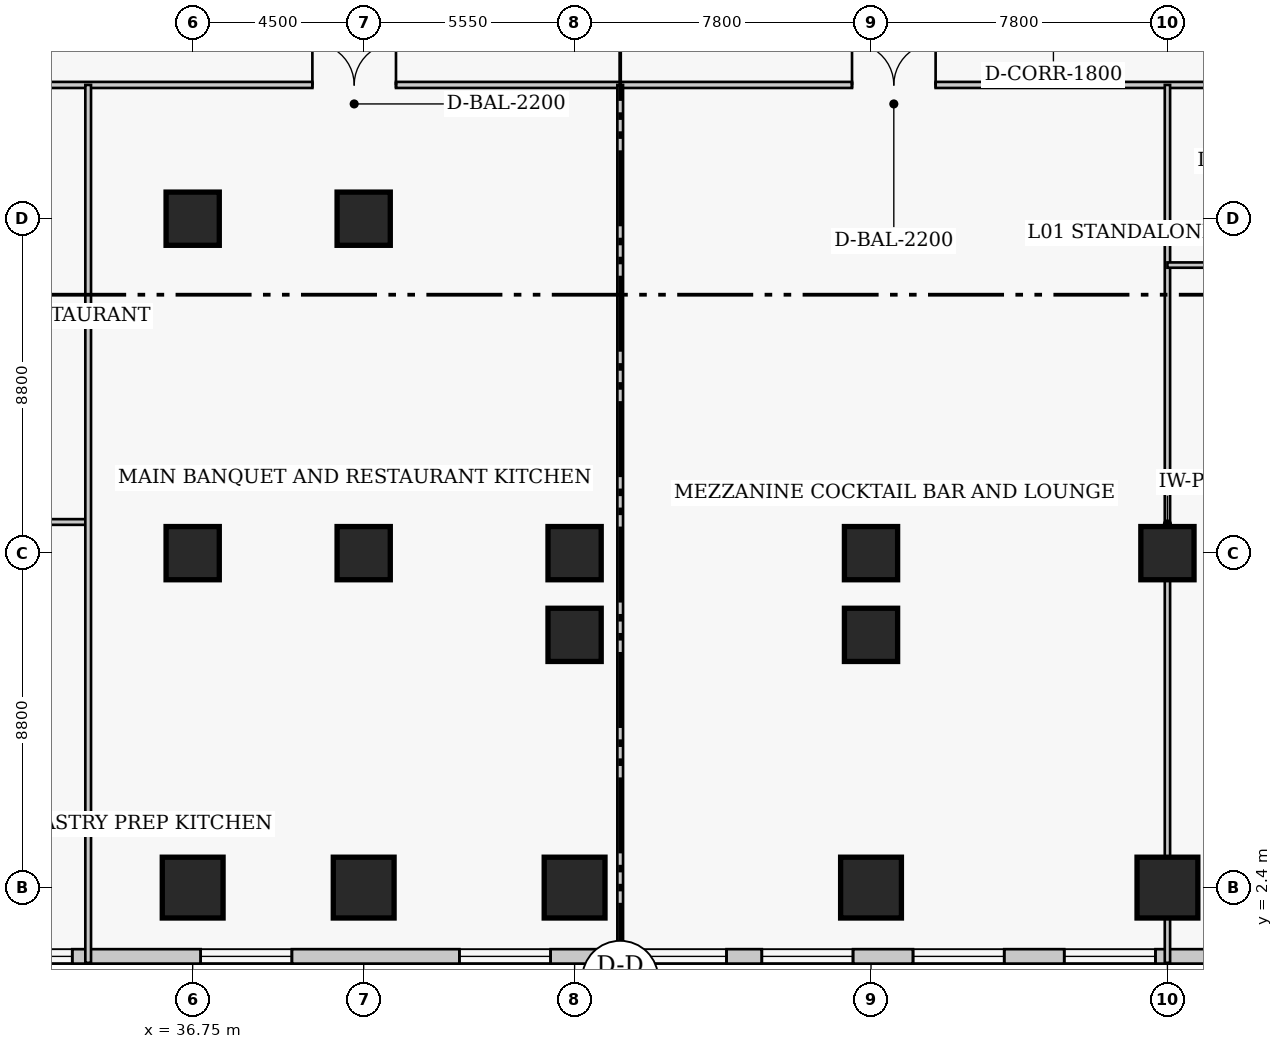
"""IFC4 building model, lengths in metres.
Left out: names, types, materials, properties, quantities, classifications, styles, units other than length and angle.
Written with IfcOpenShell. Run it as: python <this file> out.ifc"""

import sys

from ifc_helpers import new_model, si_unit, direction, frame, frame_2d, origin, origin_2d, place, context, subcontext, project, spatial, rectangle, extrude, element, fill, save


model = new_model("IFC4")
c1 = context("Model", 3, precision=1e-05, world=origin(), true_north=direction((0.0, 1.0)))
c2 = subcontext(c1, "Body", "Model", "MODEL_VIEW")
j1 = project(units=[si_unit("LENGTHUNIT", "METRE"), si_unit("PLANEANGLEUNIT", "RADIAN")], contexts=[c1])
p1 = place(None, origin())
s1 = spatial("IfcSite", under=j1, at=p1, CompositionType="ELEMENT")
p2 = place(p1, origin())
s2 = spatial("IfcBuilding", under=s1, at=p2, CompositionType="ELEMENT")
p3 = place(p2, frame((0.0, 0.0, 5.4)))
s3 = spatial("IfcBuildingStorey", under=s2, at=p3, CompositionType="ELEMENT", Elevation=5.4)
p4 = place(p3, frame((36.75, 2.4, 0.0), z_axis=(0.0, 0.0, 1.0), x_axis=(1.0, 0.0, 0.0)))
e1 = element("IfcColumn", 1, at=p4, inside=s3, PredefinedType="COLUMN", context=c2, shape_type="SweptSolid", body=[
    extrude(rectangle(XDim=1.6, YDim=1.6, at=origin_2d()), origin(), (0.0, 0.0, 1.0), 5.0),
])
for number, where, z_axis, x_axis in (
    (2, (36.75, 11.2, 0.0), (0.0, 0.0, 1.0), (1.0, 0.0, 0.0)),
    (3, (36.75, 20.0, 0.0), (0.0, 0.0, 1.0), (1.0, 0.0, 0.0)),
):
    element("IfcColumn", number, at=place(p3, frame(where, z_axis=z_axis, x_axis=x_axis)), inside=s3, PredefinedType="COLUMN", context=c2, shape_type="SweptSolid", body=[
        extrude(rectangle(XDim=1.4, YDim=1.4, at=origin_2d()), origin(), (0.0, 0.0, 1.0), 5.0),
    ])
p5 = place(p3, frame((41.25, 2.4, 0.0), z_axis=(0.0, 0.0, 1.0), x_axis=(1.0, 0.0, 0.0)))
e4 = element("IfcColumn", 4, at=p5, inside=s3, PredefinedType="COLUMN", context=c2, shape_type="SweptSolid", body=[
    extrude(rectangle(XDim=1.6, YDim=1.6, at=origin_2d()), origin(), (0.0, 0.0, 1.0), 5.0),
])
for number, where, z_axis, x_axis in (
    (5, (41.25, 11.2, 0.0), (0.0, 0.0, 1.0), (1.0, 0.0, 0.0)),
    (6, (41.25, 20.0, 0.0), (0.0, 0.0, 1.0), (1.0, 0.0, 0.0)),
):
    element("IfcColumn", number, at=place(p3, frame(where, z_axis=z_axis, x_axis=x_axis)), inside=s3, PredefinedType="COLUMN", context=c2, shape_type="SweptSolid", body=[
        extrude(rectangle(XDim=1.4, YDim=1.4, at=origin_2d()), origin(), (0.0, 0.0, 1.0), 5.0),
    ])
p6 = place(p3, frame((46.8, 2.4, 0.0), z_axis=(0.0, 0.0, 1.0), x_axis=(1.0, 0.0, 0.0)))
e7 = element("IfcColumn", 7, at=p6, inside=s3, PredefinedType="COLUMN", context=c2, shape_type="SweptSolid", body=[
    extrude(rectangle(XDim=1.6, YDim=1.6, at=origin_2d()), origin(), (0.0, 0.0, 1.0), 5.0),
])
p7 = place(p3, frame((46.8, 11.2, 0.0), z_axis=(0.0, 0.0, 1.0), x_axis=(1.0, 0.0, 0.0)))
e8 = element("IfcColumn", 8, at=p7, inside=s3, PredefinedType="COLUMN", context=c2, shape_type="SweptSolid", body=[
    extrude(rectangle(XDim=1.4, YDim=1.4, at=origin_2d()), origin(), (0.0, 0.0, 1.0), 5.0),
])
p8 = place(p3, frame((54.6, 2.4, 0.0), z_axis=(0.0, 0.0, 1.0), x_axis=(1.0, 0.0, 0.0)))
e9 = element("IfcColumn", 9, at=p8, inside=s3, PredefinedType="COLUMN", context=c2, shape_type="SweptSolid", body=[
    extrude(rectangle(XDim=1.6, YDim=1.6, at=origin_2d()), origin(), (0.0, 0.0, 1.0), 5.0),
])
p9 = place(p3, frame((54.6, 11.2, 0.0), z_axis=(0.0, 0.0, 1.0), x_axis=(1.0, 0.0, 0.0)))
e10 = element("IfcColumn", 10, at=p9, inside=s3, PredefinedType="COLUMN", context=c2, shape_type="SweptSolid", body=[
    extrude(rectangle(XDim=1.4, YDim=1.4, at=origin_2d()), origin(), (0.0, 0.0, 1.0), 5.0),
])
p10 = place(p3, frame((62.4, 2.4, 0.0), z_axis=(0.0, 0.0, 1.0), x_axis=(1.0, 0.0, 0.0)))
e11 = element("IfcColumn", 11, at=p10, inside=s3, PredefinedType="COLUMN", context=c2, shape_type="SweptSolid", body=[
    extrude(rectangle(XDim=1.6, YDim=1.6, at=origin_2d()), origin(), (0.0, 0.0, 1.0), 5.0),
])
for number, where, z_axis, x_axis in (
    (12, (62.4, 11.2, 0.0), (0.0, 0.0, 1.0), (1.0, 0.0, 0.0)),
    (13, (46.8, 9.05, 0.0), (0.0, 0.0, 1.0), (1.0, 0.0, 0.0)),
    (14, (54.6, 9.05, 0.0), (0.0, 0.0, 1.0), (1.0, 0.0, 0.0)),
):
    element("IfcColumn", number, at=place(p3, frame(where, z_axis=z_axis, x_axis=x_axis)), inside=s3, PredefinedType="COLUMN", context=c2, shape_type="SweptSolid", body=[
        extrude(rectangle(XDim=1.4, YDim=1.4, at=origin_2d()), origin(), (0.0, 0.0, 1.0), 5.0),
    ])
p11 = place(p3, frame((-0.79, 0.59, 0.0), z_axis=(0.0, 0.0, 1.0), x_axis=(1.0, 0.0, 0.0)))
e15 = element("IfcWall", 15, at=p11, inside=s3, PredefinedType="SOLIDWALL", context=c2, shape_type="SweptSolid", body=[
    extrude(rectangle(XDim=79.58, YDim=0.38, at=frame_2d((39.79, 0.0))), origin(), (0.0, 0.0, 1.0), 4.65),
])
p12 = place(p11, frame((1.439, 0.0, 0.75)))
e16 = element("IfcOpeningElement", 16, at=p12, cuts=e15, PredefinedType="OPENING", context=c2, shape_type="SweptSolid", body=[
    extrude(rectangle(XDim=2.4, YDim=2.2, at=frame_2d((1.2, 1.1))), frame((0.0, 0.2, 0.0), z_axis=(0.0, -1.0, 0.0), x_axis=(1.0, 0.0, 0.0)), (0.0, 0.0, 1.0), 0.4),
])
p13 = place(p11, frame((4.769, 0.0, 0.75)))
e17 = element("IfcOpeningElement", 17, at=p13, cuts=e15, PredefinedType="OPENING", context=c2, shape_type="SweptSolid", body=[
    extrude(rectangle(XDim=2.4, YDim=2.2, at=frame_2d((1.2, 1.1))), frame((0.0, 0.2, 0.0), z_axis=(0.0, -1.0, 0.0), x_axis=(1.0, 0.0, 0.0)), (0.0, 0.0, 1.0), 0.4),
])
p14 = place(p11, frame((16.706, 0.0, 0.75)))
e18 = element("IfcOpeningElement", 18, at=p14, cuts=e15, PredefinedType="OPENING", context=c2, shape_type="SweptSolid", body=[
    extrude(rectangle(XDim=2.4, YDim=2.2, at=frame_2d((1.2, 1.1))), frame((0.0, 0.2, 0.0), z_axis=(0.0, -1.0, 0.0), x_axis=(1.0, 0.0, 0.0)), (0.0, 0.0, 1.0), 0.4),
])
p15 = place(p11, frame((20.685, 0.0, 0.75)))
e19 = element("IfcOpeningElement", 19, at=p15, cuts=e15, PredefinedType="OPENING", context=c2, shape_type="SweptSolid", body=[
    extrude(rectangle(XDim=2.4, YDim=2.2, at=frame_2d((1.2, 1.1))), frame((0.0, 0.2, 0.0), z_axis=(0.0, -1.0, 0.0), x_axis=(1.0, 0.0, 0.0)), (0.0, 0.0, 1.0), 0.4),
])
p16 = place(p11, frame((24.664, 0.0, 0.75)))
e20 = element("IfcOpeningElement", 20, at=p16, cuts=e15, PredefinedType="OPENING", context=c2, shape_type="SweptSolid", body=[
    extrude(rectangle(XDim=2.4, YDim=2.2, at=frame_2d((1.2, 1.1))), frame((0.0, 0.2, 0.0), z_axis=(0.0, -1.0, 0.0), x_axis=(1.0, 0.0, 0.0)), (0.0, 0.0, 1.0), 0.4),
])
p17 = place(p11, frame((28.643, 0.0, 0.75)))
e21 = element("IfcOpeningElement", 21, at=p17, cuts=e15, PredefinedType="OPENING", context=c2, shape_type="SweptSolid", body=[
    extrude(rectangle(XDim=2.4, YDim=2.2, at=frame_2d((1.2, 1.1))), frame((0.0, 0.2, 0.0), z_axis=(0.0, -1.0, 0.0), x_axis=(1.0, 0.0, 0.0)), (0.0, 0.0, 1.0), 0.4),
])
p18 = place(p11, frame((31.971, 0.0, 0.75)))
e22 = element("IfcOpeningElement", 22, at=p18, cuts=e15, PredefinedType="OPENING", context=c2, shape_type="SweptSolid", body=[
    extrude(rectangle(XDim=2.4, YDim=2.2, at=frame_2d((1.2, 1.1))), frame((0.0, 0.2, 0.0), z_axis=(0.0, -1.0, 0.0), x_axis=(1.0, 0.0, 0.0)), (0.0, 0.0, 1.0), 0.4),
])
p19 = place(p11, frame((37.75, 0.0, 0.75)))
e23 = element("IfcOpeningElement", 23, at=p19, cuts=e15, PredefinedType="OPENING", context=c2, shape_type="SweptSolid", body=[
    extrude(rectangle(XDim=2.4, YDim=2.2, at=frame_2d((1.2, 1.1))), frame((0.0, 0.2, 0.0), z_axis=(0.0, -1.0, 0.0), x_axis=(1.0, 0.0, 0.0)), (0.0, 0.0, 1.0), 0.4),
])
p20 = place(p11, frame((44.559, 0.0, 0.75)))
e24 = element("IfcOpeningElement", 24, at=p20, cuts=e15, PredefinedType="OPENING", context=c2, shape_type="SweptSolid", body=[
    extrude(rectangle(XDim=2.4, YDim=2.2, at=frame_2d((1.2, 1.1))), frame((0.0, 0.2, 0.0), z_axis=(0.0, -1.0, 0.0), x_axis=(1.0, 0.0, 0.0)), (0.0, 0.0, 1.0), 0.4),
])
p21 = place(p11, frame((49.188, 0.0, 0.75)))
e25 = element("IfcOpeningElement", 25, at=p21, cuts=e15, PredefinedType="OPENING", context=c2, shape_type="SweptSolid", body=[
    extrude(rectangle(XDim=2.4, YDim=2.2, at=frame_2d((1.2, 1.1))), frame((0.0, 0.2, 0.0), z_axis=(0.0, -1.0, 0.0), x_axis=(1.0, 0.0, 0.0)), (0.0, 0.0, 1.0), 0.4),
])
p22 = place(p11, frame((52.517, 0.0, 0.75)))
e26 = element("IfcOpeningElement", 26, at=p22, cuts=e15, PredefinedType="OPENING", context=c2, shape_type="SweptSolid", body=[
    extrude(rectangle(XDim=2.4, YDim=2.2, at=frame_2d((1.2, 1.1))), frame((0.0, 0.2, 0.0), z_axis=(0.0, -1.0, 0.0), x_axis=(1.0, 0.0, 0.0)), (0.0, 0.0, 1.0), 0.4),
])
p23 = place(p11, frame((56.496, 0.0, 0.75)))
e27 = element("IfcOpeningElement", 27, at=p23, cuts=e15, PredefinedType="OPENING", context=c2, shape_type="SweptSolid", body=[
    extrude(rectangle(XDim=2.4, YDim=2.2, at=frame_2d((1.2, 1.1))), frame((0.0, 0.2, 0.0), z_axis=(0.0, -1.0, 0.0), x_axis=(1.0, 0.0, 0.0)), (0.0, 0.0, 1.0), 0.4),
])
p24 = place(p11, frame((60.475, 0.0, 0.75)))
e28 = element("IfcOpeningElement", 28, at=p24, cuts=e15, PredefinedType="OPENING", context=c2, shape_type="SweptSolid", body=[
    extrude(rectangle(XDim=2.4, YDim=2.2, at=frame_2d((1.2, 1.1))), frame((0.0, 0.2, 0.0), z_axis=(0.0, -1.0, 0.0), x_axis=(1.0, 0.0, 0.0)), (0.0, 0.0, 1.0), 0.4),
])
p25 = place(p11, frame((64.454, 0.0, 0.75)))
e29 = element("IfcOpeningElement", 29, at=p25, cuts=e15, PredefinedType="OPENING", context=c2, shape_type="SweptSolid", body=[
    extrude(rectangle(XDim=2.4, YDim=2.2, at=frame_2d((1.2, 1.1))), frame((0.0, 0.2, 0.0), z_axis=(0.0, -1.0, 0.0), x_axis=(1.0, 0.0, 0.0)), (0.0, 0.0, 1.0), 0.4),
])
p26 = place(p11, frame((68.433, 0.0, 0.75)))
e30 = element("IfcOpeningElement", 30, at=p26, cuts=e15, PredefinedType="OPENING", context=c2, shape_type="SweptSolid", body=[
    extrude(rectangle(XDim=2.4, YDim=2.2, at=frame_2d((1.2, 1.1))), frame((0.0, 0.2, 0.0), z_axis=(0.0, -1.0, 0.0), x_axis=(1.0, 0.0, 0.0)), (0.0, 0.0, 1.0), 0.4),
])
p27 = place(p11, frame((72.412, 0.0, 0.75)))
e31 = element("IfcOpeningElement", 31, at=p27, cuts=e15, PredefinedType="OPENING", context=c2, shape_type="SweptSolid", body=[
    extrude(rectangle(XDim=2.4, YDim=2.2, at=frame_2d((1.2, 1.1))), frame((0.0, 0.2, 0.0), z_axis=(0.0, -1.0, 0.0), x_axis=(1.0, 0.0, 0.0)), (0.0, 0.0, 1.0), 0.4),
])
p28 = place(p11, frame((75.74, 0.0, 0.75)))
e32 = element("IfcOpeningElement", 32, at=p28, cuts=e15, PredefinedType="OPENING", context=c2, shape_type="SweptSolid", body=[
    extrude(rectangle(XDim=2.4, YDim=2.2, at=frame_2d((1.2, 1.1))), frame((0.0, 0.2, 0.0), z_axis=(0.0, -1.0, 0.0), x_axis=(1.0, 0.0, 0.0)), (0.0, 0.0, 1.0), 0.4),
])
p29 = place(p3, frame((-2.98, 23.52, 0.0), z_axis=(0.0, 0.0, 1.0), x_axis=(1.0, 0.0, 0.0)))
e33 = element("IfcWall", 33, at=p29, inside=s3, PredefinedType="PARTITIONING", context=c2, shape_type="SweptSolid", body=[
    extrude(rectangle(XDim=83.96, YDim=0.16, at=frame_2d((41.98, 0.0))), origin(), (0.0, 0.0, 1.0), 4.65),
])
p30 = place(p29, frame((7.13, 0.0, 0.0)))
e34 = element("IfcOpeningElement", 34, at=p30, cuts=e33, PredefinedType="OPENING", context=c2, shape_type="SweptSolid", body=[
    extrude(rectangle(XDim=1.0, YDim=2.15, at=frame_2d((0.5, 1.075))), frame((0.0, 0.09, 0.0), z_axis=(0.0, -1.0, 0.0), x_axis=(1.0, 0.0, 0.0)), (0.0, 0.0, 1.0), 0.18),
])
p31 = place(p29, frame((11.96, 0.0, 0.0)))
e35 = element("IfcOpeningElement", 35, at=p31, cuts=e33, PredefinedType="OPENING", context=c2, shape_type="SweptSolid", body=[
    extrude(rectangle(XDim=1.1, YDim=2.15, at=frame_2d((0.55, 1.075))), frame((0.0, 0.09, 0.0), z_axis=(0.0, -1.0, 0.0), x_axis=(1.0, 0.0, 0.0)), (0.0, 0.0, 1.0), 0.18),
])
p32 = place(p29, frame((15.205, 0.0, 0.0)))
e36 = element("IfcOpeningElement", 36, at=p32, cuts=e33, PredefinedType="OPENING", context=c2, shape_type="SweptSolid", body=[
    extrude(rectangle(XDim=0.95, YDim=2.1, at=frame_2d((0.475, 1.05))), frame((0.0, 0.09, 0.0), z_axis=(0.0, -1.0, 0.0), x_axis=(1.0, 0.0, 0.0)), (0.0, 0.0, 1.0), 0.18),
])
p33 = place(p29, frame((28.63, 0.0, 0.0)))
e37 = element("IfcOpeningElement", 37, at=p33, cuts=e33, PredefinedType="OPENING", context=c2, shape_type="SweptSolid", body=[
    extrude(rectangle(XDim=2.2, YDim=2.4, at=frame_2d((1.1, 1.2))), frame((0.0, 0.09, 0.0), z_axis=(0.0, -1.0, 0.0), x_axis=(1.0, 0.0, 0.0)), (0.0, 0.0, 1.0), 0.18),
])
p34 = place(p29, frame((42.88, 0.0, 0.0)))
e38 = element("IfcOpeningElement", 38, at=p34, cuts=e33, PredefinedType="OPENING", context=c2, shape_type="SweptSolid", body=[
    extrude(rectangle(XDim=2.2, YDim=2.4, at=frame_2d((1.1, 1.2))), frame((0.0, 0.09, 0.0), z_axis=(0.0, -1.0, 0.0), x_axis=(1.0, 0.0, 0.0)), (0.0, 0.0, 1.0), 0.18),
])
p35 = place(p29, frame((57.08, 0.0, 0.0)))
e39 = element("IfcOpeningElement", 39, at=p35, cuts=e33, PredefinedType="OPENING", context=c2, shape_type="SweptSolid", body=[
    extrude(rectangle(XDim=2.2, YDim=2.4, at=frame_2d((1.1, 1.2))), frame((0.0, 0.09, 0.0), z_axis=(0.0, -1.0, 0.0), x_axis=(1.0, 0.0, 0.0)), (0.0, 0.0, 1.0), 0.18),
])
p36 = place(p29, frame((67.34, 0.0, 0.0)))
e40 = element("IfcOpeningElement", 40, at=p36, cuts=e33, PredefinedType="OPENING", context=c2, shape_type="SweptSolid", body=[
    extrude(rectangle(XDim=0.88, YDim=2.05, at=frame_2d((0.44, 1.025))), frame((0.0, 0.09, 0.0), z_axis=(0.0, -1.0, 0.0), x_axis=(1.0, 0.0, 0.0)), (0.0, 0.0, 1.0), 0.18),
])
p37 = place(p29, frame((76.29, 0.0, 0.0)))
e41 = element("IfcOpeningElement", 41, at=p37, cuts=e33, PredefinedType="OPENING", context=c2, shape_type="SweptSolid", body=[
    extrude(rectangle(XDim=0.88, YDim=2.05, at=frame_2d((0.44, 1.025))), frame((0.0, 0.09, 0.0), z_axis=(0.0, -1.0, 0.0), x_axis=(1.0, 0.0, 0.0)), (0.0, 0.0, 1.0), 0.18),
])
p38 = place(p3, frame((19.5, 12.02, 0.0), z_axis=(0.0, 0.0, 1.0), x_axis=(1.0, 0.0, 0.0)))
e42 = element("IfcWall", 42, at=p38, inside=s3, PredefinedType="PARTITIONING", context=c2, shape_type="SweptSolid", body=[
    extrude(rectangle(XDim=14.5, YDim=0.15, at=frame_2d((7.25, 0.0))), origin(), (0.0, 0.0, 1.0), 4.65),
])
p39 = place(p38, frame((6.1, 0.0, 0.0)))
e43 = element("IfcOpeningElement", 43, at=p39, cuts=e42, PredefinedType="OPENING", context=c2, shape_type="SweptSolid", body=[
    extrude(rectangle(XDim=1.8, YDim=2.2, at=frame_2d((0.9, 1.1))), frame((0.0, 0.085, 0.0), z_axis=(0.0, -1.0, 0.0), x_axis=(1.0, 0.0, 0.0)), (0.0, 0.0, 1.0), 0.17),
])
for number, where, z_axis, x_axis in (
    (44, (34.0, 0.42, 0.0), (0.0, 0.0, 1.0), (0.0, 1.0, 0.0)),
    (45, (48.0, 0.42, 0.0), (0.0, 0.0, 1.0), (0.0, 1.0, 0.0)),
):
    element("IfcWall", number, at=place(p3, frame(where, z_axis=z_axis, x_axis=x_axis)), inside=s3, PredefinedType="PARTITIONING", context=c2, shape_type="SweptSolid", body=[
        extrude(rectangle(XDim=23.1, YDim=0.15, at=frame_2d((11.55, 0.0))), origin(), (0.0, 0.0, 1.0), 4.65),
    ])
p40 = place(p3, frame((62.4, 0.42, 0.0), z_axis=(0.0, 0.0, 1.0), x_axis=(0.0, 1.0, 0.0)))
e46 = element("IfcWall", 46, at=p40, inside=s3, PredefinedType="PLUMBINGWALL", context=c2, shape_type="SweptSolid", body=[
    extrude(rectangle(XDim=23.1, YDim=0.14, at=frame_2d((11.55, 0.0))), origin(), (0.0, 0.0, 1.0), 3.9),
])
p41 = place(p3, frame((62.4, 18.78, 0.0), z_axis=(0.0, 0.0, 1.0), x_axis=(1.0, 0.0, 0.0)))
e47 = element("IfcWall", 47, at=p41, inside=s3, PredefinedType="PLUMBINGWALL", context=c2, shape_type="SweptSolid", body=[
    extrude(rectangle(XDim=18.58, YDim=0.14, at=frame_2d((9.29, 0.0))), origin(), (0.0, 0.0, 1.0), 4.65),
])
p42 = place(p41, frame((9.489, 0.0, 0.0)))
e48 = element("IfcOpeningElement", 48, at=p42, cuts=e47, PredefinedType="OPENING", context=c2, shape_type="SweptSolid", body=[
    extrude(rectangle(XDim=0.88, YDim=2.05, at=frame_2d((0.44, 1.025))), frame((0.0, 0.08, 0.0), z_axis=(0.0, -1.0, 0.0), x_axis=(1.0, 0.0, 0.0)), (0.0, 0.0, 1.0), 0.16),
])
p43 = place(p18, origin())
e49 = element("IfcWindow", 49, at=p43, inside=s3, PartitioningType="SINGLE_PANEL", PredefinedType="WINDOW", context=c2, shape_type="SweptSolid", body=[
    extrude(rectangle(XDim=2.4, YDim=2.2, at=frame_2d((1.2, 1.1))), frame((0.0, 0.03, 0.0), z_axis=(0.0, -1.0, 0.0), x_axis=(1.0, 0.0, 0.0)), (0.0, 0.0, 1.0), 0.06),
])
fill(e22, e49)
p44 = place(p19, origin())
e50 = element("IfcWindow", 50, at=p44, inside=s3, PartitioningType="SINGLE_PANEL", PredefinedType="WINDOW", context=c2, shape_type="SweptSolid", body=[
    extrude(rectangle(XDim=2.4, YDim=2.2, at=frame_2d((1.2, 1.1))), frame((0.0, 0.03, 0.0), z_axis=(0.0, -1.0, 0.0), x_axis=(1.0, 0.0, 0.0)), (0.0, 0.0, 1.0), 0.06),
])
fill(e23, e50)
p45 = place(p20, origin())
e51 = element("IfcWindow", 51, at=p45, inside=s3, PartitioningType="SINGLE_PANEL", PredefinedType="WINDOW", context=c2, shape_type="SweptSolid", body=[
    extrude(rectangle(XDim=2.4, YDim=2.2, at=frame_2d((1.2, 1.1))), frame((0.0, 0.03, 0.0), z_axis=(0.0, -1.0, 0.0), x_axis=(1.0, 0.0, 0.0)), (0.0, 0.0, 1.0), 0.06),
])
fill(e24, e51)
p46 = place(p21, origin())
e52 = element("IfcWindow", 52, at=p46, inside=s3, PartitioningType="SINGLE_PANEL", PredefinedType="WINDOW", context=c2, shape_type="SweptSolid", body=[
    extrude(rectangle(XDim=2.4, YDim=2.2, at=frame_2d((1.2, 1.1))), frame((0.0, 0.03, 0.0), z_axis=(0.0, -1.0, 0.0), x_axis=(1.0, 0.0, 0.0)), (0.0, 0.0, 1.0), 0.06),
])
fill(e25, e52)
p47 = place(p22, origin())
e53 = element("IfcWindow", 53, at=p47, inside=s3, PartitioningType="SINGLE_PANEL", PredefinedType="WINDOW", context=c2, shape_type="SweptSolid", body=[
    extrude(rectangle(XDim=2.4, YDim=2.2, at=frame_2d((1.2, 1.1))), frame((0.0, 0.03, 0.0), z_axis=(0.0, -1.0, 0.0), x_axis=(1.0, 0.0, 0.0)), (0.0, 0.0, 1.0), 0.06),
])
fill(e26, e53)
p48 = place(p23, origin())
e54 = element("IfcWindow", 54, at=p48, inside=s3, PartitioningType="SINGLE_PANEL", PredefinedType="WINDOW", context=c2, shape_type="SweptSolid", body=[
    extrude(rectangle(XDim=2.4, YDim=2.2, at=frame_2d((1.2, 1.1))), frame((0.0, 0.03, 0.0), z_axis=(0.0, -1.0, 0.0), x_axis=(1.0, 0.0, 0.0)), (0.0, 0.0, 1.0), 0.06),
])
fill(e27, e54)
p49 = place(p24, origin())
e55 = element("IfcWindow", 55, at=p49, inside=s3, PartitioningType="SINGLE_PANEL", PredefinedType="WINDOW", context=c2, shape_type="SweptSolid", body=[
    extrude(rectangle(XDim=2.4, YDim=2.2, at=frame_2d((1.2, 1.1))), frame((0.0, 0.03, 0.0), z_axis=(0.0, -1.0, 0.0), x_axis=(1.0, 0.0, 0.0)), (0.0, 0.0, 1.0), 0.06),
])
fill(e28, e55)
p50 = place(p34, origin())
e56 = element("IfcDoor", 56, at=p50, inside=s3, OperationType="DOUBLE_DOOR_SINGLE_SWING", PredefinedType="DOOR", context=c2, shape_type="SweptSolid", body=[
    extrude(rectangle(XDim=2.2, YDim=2.4, at=frame_2d((1.1, 1.2))), frame((0.0, 0.025, 0.0), z_axis=(0.0, -1.0, 0.0), x_axis=(1.0, 0.0, 0.0)), (0.0, 0.0, 1.0), 0.05),
])
fill(e38, e56)
p51 = place(p35, origin())
e57 = element("IfcDoor", 57, at=p51, inside=s3, OperationType="DOUBLE_DOOR_SINGLE_SWING", PredefinedType="DOOR", context=c2, shape_type="SweptSolid", body=[
    extrude(rectangle(XDim=2.2, YDim=2.4, at=frame_2d((1.1, 1.2))), frame((0.0, 0.025, 0.0), z_axis=(0.0, -1.0, 0.0), x_axis=(1.0, 0.0, 0.0)), (0.0, 0.0, 1.0), 0.05),
])
fill(e39, e57)
save(model, sys.argv[1])
